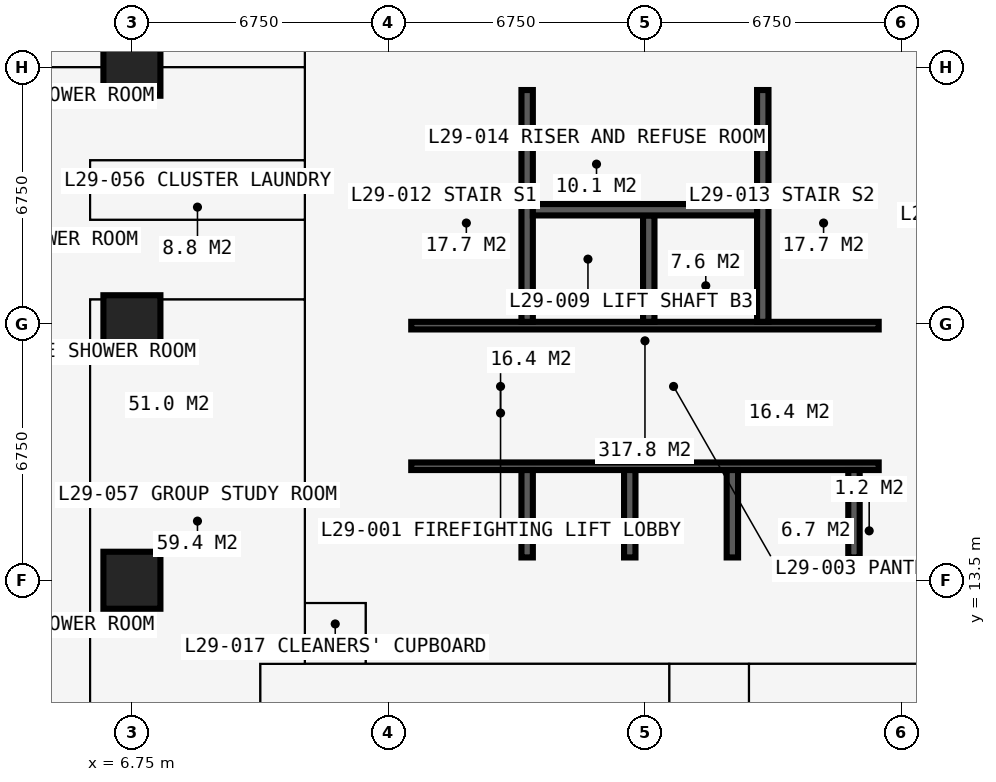
"""IFC4 building model, lengths in metres.
Left out: names, types, materials, properties, quantities, classifications, styles, units other than length and angle.
Written with IfcOpenShell. Run it as: python <this file> out.ifc"""

import sys

from ifc_helpers import new_model, si_unit, direction, frame, frame_2d, origin, origin_2d, place, context, subcontext, project, spatial, rectangle, extrude, element, fill, save


model = new_model("IFC4")
c1 = context("Model", 3, precision=1e-05, world=origin(), true_north=direction((0.0, 1.0)))
c2 = subcontext(c1, "Body", "Model", "MODEL_VIEW")
j1 = project(units=[si_unit("LENGTHUNIT", "METRE"), si_unit("PLANEANGLEUNIT", "RADIAN")], contexts=[c1])
p1 = place(None, origin())
s1 = spatial("IfcSite", under=j1, at=p1, CompositionType="ELEMENT")
p2 = place(p1, origin())
s2 = spatial("IfcBuilding", under=s1, at=p2, CompositionType="ELEMENT")
p3 = place(p2, frame((0.0, 0.0, 108.9)))
s3 = spatial("IfcBuildingStorey", under=s2, at=p3, CompositionType="ELEMENT", Elevation=108.9)
for number, where, z_axis, x_axis in (
    (1, (6.75, 13.5, 0.0), (0.0, 0.0, 1.0), (1.0, 0.0, 0.0)),
    (2, (6.75, 20.25, 0.0), (0.0, 0.0, 1.0), (1.0, 0.0, 0.0)),
    (3, (6.75, 27.0, 0.0), (0.0, 0.0, 1.0), (1.0, 0.0, 0.0)),
):
    element("IfcColumn", number, at=place(p3, frame(where, z_axis=z_axis, x_axis=x_axis)), inside=s3, PredefinedType="COLUMN", context=c2, shape_type="SweptSolid", body=[
        extrude(rectangle(XDim=1.5, YDim=1.5, at=origin_2d()), origin(), (0.0, 0.0, 1.0), 3.6),
    ])
p4 = place(p3, frame((12.9, 13.5, 0.0), z_axis=(0.0, 0.0, 1.0), x_axis=(1.0, 0.0, 0.0)))
e4 = element("IfcWall", 4, at=p4, inside=s3, PredefinedType="SHEAR", context=c2, shape_type="SweptSolid", body=[
    extrude(rectangle(XDim=14.7, YDim=1.2, at=frame_2d((7.35, 0.0))), origin(), (0.0, 0.0, 1.0), 3.6),
])
p5 = place(p3, frame((27.0, 14.1, 0.0), z_axis=(0.0, 0.0, 1.0), x_axis=(0.0, 1.0, 0.0)))
e5 = element("IfcWall", 5, at=p5, inside=s3, PredefinedType="SHEAR", context=c2, shape_type="SweptSolid", body=[
    extrude(rectangle(XDim=12.3, YDim=1.2, at=frame_2d((6.15, 0.0))), origin(), (0.0, 0.0, 1.0), 3.6),
])
p6 = place(p5, frame((3.65, 0.0, 0.0)))
e6 = element("IfcOpeningElement", 6, at=p6, cuts=e5, PredefinedType="OPENING", context=c2, shape_type="SweptSolid", body=[
    extrude(rectangle(XDim=1.2, YDim=2.2, at=frame_2d((0.6, 1.1))), frame((0.0, 0.61, 0.0), z_axis=(0.0, -1.0, 0.0), x_axis=(1.0, 0.0, 0.0)), (0.0, 0.0, 1.0), 1.22),
])
p7 = place(p3, frame((27.6, 27.0, 0.0), z_axis=(0.0, 0.0, 1.0), x_axis=(-1.0, 0.0, 0.0)))
e7 = element("IfcWall", 7, at=p7, inside=s3, PredefinedType="SHEAR", context=c2, shape_type="SweptSolid", body=[
    extrude(rectangle(XDim=14.7, YDim=1.2, at=frame_2d((7.35, 0.0))), origin(), (0.0, 0.0, 1.0), 3.6),
])
p8 = place(p7, frame((4.55, 0.0, 0.0)))
e8 = element("IfcOpeningElement", 8, at=p8, cuts=e7, PredefinedType="OPENING", context=c2, shape_type="SweptSolid", body=[
    extrude(rectangle(XDim=0.9, YDim=2.2, at=frame_2d((0.45, 1.1))), frame((0.0, 0.61, 0.0), z_axis=(0.0, -1.0, 0.0), x_axis=(1.0, 0.0, 0.0)), (0.0, 0.0, 1.0), 1.22),
])
p9 = place(p7, frame((7.525, 0.0, 0.0)))
e9 = element("IfcOpeningElement", 9, at=p9, cuts=e7, PredefinedType="OPENING", context=c2, shape_type="SweptSolid", body=[
    extrude(rectangle(XDim=1.0, YDim=2.2, at=frame_2d((0.5, 1.1))), frame((0.0, 0.61, 0.0), z_axis=(0.0, -1.0, 0.0), x_axis=(1.0, 0.0, 0.0)), (0.0, 0.0, 1.0), 1.22),
])
p10 = place(p3, frame((13.5, 26.4, 0.0), z_axis=(0.0, 0.0, 1.0), x_axis=(0.0, -1.0, 0.0)))
e10 = element("IfcWall", 10, at=p10, inside=s3, PredefinedType="SHEAR", context=c2, shape_type="SweptSolid", body=[
    extrude(rectangle(XDim=12.3, YDim=1.2, at=frame_2d((6.15, 0.0))), origin(), (0.0, 0.0, 1.0), 3.6),
])
p11 = place(p10, frame((7.45, 0.0, 0.0)))
e11 = element("IfcOpeningElement", 11, at=p11, cuts=e10, PredefinedType="OPENING", context=c2, shape_type="SweptSolid", body=[
    extrude(rectangle(XDim=1.2, YDim=2.2, at=frame_2d((0.6, 1.1))), frame((0.0, 0.61, 0.0), z_axis=(0.0, -1.0, 0.0), x_axis=(1.0, 0.0, 0.0)), (0.0, 0.0, 1.0), 1.22),
])
p12 = place(p3, frame((14.1, 16.5, 0.0), z_axis=(0.0, 0.0, 1.0), x_axis=(1.0, 0.0, 0.0)))
e12 = element("IfcWall", 12, at=p12, inside=s3, PredefinedType="SHEAR", context=c2, shape_type="SweptSolid", body=[
    extrude(rectangle(XDim=12.3, YDim=0.2, at=frame_2d((6.15, 0.0))), origin(), (0.0, 0.0, 1.0), 3.6),
])
p13 = place(p12, frame((0.9, 0.0, 0.0)))
e13 = element("IfcOpeningElement", 13, at=p13, cuts=e12, PredefinedType="OPENING", context=c2, shape_type="SweptSolid", body=[
    extrude(rectangle(XDim=1.1, YDim=2.2, at=frame_2d((0.55, 1.1))), frame((0.0, 0.11, 0.0), z_axis=(0.0, -1.0, 0.0), x_axis=(1.0, 0.0, 0.0)), (0.0, 0.0, 1.0), 0.22),
])
p14 = place(p12, frame((9.5, 0.0, 0.0)))
e14 = element("IfcOpeningElement", 14, at=p14, cuts=e12, PredefinedType="OPENING", context=c2, shape_type="SweptSolid", body=[
    extrude(rectangle(XDim=1.1, YDim=2.2, at=frame_2d((0.55, 1.1))), frame((0.0, 0.11, 0.0), z_axis=(0.0, -1.0, 0.0), x_axis=(1.0, 0.0, 0.0)), (0.0, 0.0, 1.0), 0.22),
])
p15 = place(p3, frame((14.1, 20.2, 0.0), z_axis=(0.0, 0.0, 1.0), x_axis=(1.0, 0.0, 0.0)))
e15 = element("IfcWall", 15, at=p15, inside=s3, PredefinedType="SHEAR", context=c2, shape_type="SweptSolid", body=[
    extrude(rectangle(XDim=12.3, YDim=0.2, at=frame_2d((6.15, 0.0))), origin(), (0.0, 0.0, 1.0), 3.6),
])
p16 = place(p15, frame((0.35, 0.0, 0.0)))
e16 = element("IfcOpeningElement", 16, at=p16, cuts=e15, PredefinedType="OPENING", context=c2, shape_type="SweptSolid", body=[
    extrude(rectangle(XDim=1.1, YDim=2.2, at=frame_2d((0.55, 1.1))), frame((0.0, 0.11, 0.0), z_axis=(0.0, -1.0, 0.0), x_axis=(1.0, 0.0, 0.0)), (0.0, 0.0, 1.0), 0.22),
])
p17 = place(p15, frame((9.75, 0.0, 0.0)))
e17 = element("IfcOpeningElement", 17, at=p17, cuts=e15, PredefinedType="OPENING", context=c2, shape_type="SweptSolid", body=[
    extrude(rectangle(XDim=1.1, YDim=2.2, at=frame_2d((0.55, 1.1))), frame((0.0, 0.11, 0.0), z_axis=(0.0, -1.0, 0.0), x_axis=(1.0, 0.0, 0.0)), (0.0, 0.0, 1.0), 0.22),
])
for number, where, z_axis, x_axis in (
    (18, (17.15, 20.3, 0.0), (0.0, 0.0, 1.0), (0.0, 1.0, 0.0)),
    (19, (23.35, 20.3, 0.0), (0.0, 0.0, 1.0), (0.0, 1.0, 0.0)),
):
    element("IfcWall", number, at=place(p3, frame(where, z_axis=z_axis, x_axis=x_axis)), inside=s3, PredefinedType="SHEAR", context=c2, shape_type="SweptSolid", body=[
        extrude(rectangle(XDim=6.1, YDim=0.3, at=frame_2d((3.05, 0.0))), origin(), (0.0, 0.0, 1.0), 3.6),
    ])
p18 = place(p3, frame((20.35, 20.3, 0.0), z_axis=(0.0, 0.0, 1.0), x_axis=(0.0, 1.0, 0.0)))
e20 = element("IfcWall", 20, at=p18, inside=s3, PredefinedType="SHEAR", context=c2, shape_type="SweptSolid", body=[
    extrude(rectangle(XDim=2.8, YDim=0.3, at=frame_2d((1.4, 0.0))), origin(), (0.0, 0.0, 1.0), 3.6),
])
p19 = place(p3, frame((17.3, 23.25, 0.0), z_axis=(0.0, 0.0, 1.0), x_axis=(1.0, 0.0, 0.0)))
e21 = element("IfcWall", 21, at=p19, inside=s3, PredefinedType="SHEAR", context=c2, shape_type="SweptSolid", body=[
    extrude(rectangle(XDim=5.9, YDim=0.3, at=frame_2d((2.95, 0.0))), origin(), (0.0, 0.0, 1.0), 3.6),
])
for number, where, z_axis, x_axis in (
    (22, (17.15, 14.1, 0.0), (0.0, 0.0, 1.0), (0.0, 1.0, 0.0)),
    (23, (19.85, 14.1, 0.0), (0.0, 0.0, 1.0), (0.0, 1.0, 0.0)),
    (24, (22.55, 14.1, 0.0), (0.0, 0.0, 1.0), (0.0, 1.0, 0.0)),
    (25, (25.75, 14.1, 0.0), (0.0, 0.0, 1.0), (0.0, 1.0, 0.0)),
):
    element("IfcWall", number, at=place(p3, frame(where, z_axis=z_axis, x_axis=x_axis)), inside=s3, PredefinedType="SHEAR", context=c2, shape_type="SweptSolid", body=[
        extrude(rectangle(XDim=2.3, YDim=0.3, at=frame_2d((1.15, 0.0))), origin(), (0.0, 0.0, 1.0), 3.6),
    ])
p20 = place(p3, frame((18.875, 16.6, 0.0), z_axis=(0.0, 0.0, 1.0), x_axis=(0.0, 1.0, 0.0)))
e26 = element("IfcWall", 26, at=p20, inside=s3, PredefinedType="PARTITIONING", context=c2, shape_type="SweptSolid", body=[
    extrude(rectangle(XDim=3.5, YDim=0.15, at=frame_2d((1.75, 0.0))), origin(), (0.0, 0.0, 1.0), 3.375),
])
p21 = place(p20, frame((1.15, 0.0, 0.0)))
e27 = element("IfcOpeningElement", 27, at=p21, cuts=e26, PredefinedType="OPENING", context=c2, shape_type="SweptSolid", body=[
    extrude(rectangle(XDim=1.2, YDim=2.2, at=frame_2d((0.6, 1.1))), frame((0.0, 0.085, 0.0), z_axis=(0.0, -1.0, 0.0), x_axis=(1.0, 0.0, 0.0)), (0.0, 0.0, 1.0), 0.17),
])
p22 = place(p3, frame((21.625, 16.6, 0.0), z_axis=(0.0, 0.0, 1.0), x_axis=(0.0, 1.0, 0.0)))
e28 = element("IfcWall", 28, at=p22, inside=s3, PredefinedType="PARTITIONING", context=c2, shape_type="SweptSolid", body=[
    extrude(rectangle(XDim=3.5, YDim=0.15, at=frame_2d((1.75, 0.0))), origin(), (0.0, 0.0, 1.0), 3.375),
])
p23 = place(p22, frame((1.15, 0.0, 0.0)))
e29 = element("IfcOpeningElement", 29, at=p23, cuts=e28, PredefinedType="OPENING", context=c2, shape_type="SweptSolid", body=[
    extrude(rectangle(XDim=1.2, YDim=2.2, at=frame_2d((0.6, 1.1))), frame((0.0, 0.085, 0.0), z_axis=(0.0, -1.0, 0.0), x_axis=(1.0, 0.0, 0.0)), (0.0, 0.0, 1.0), 0.17),
])
p24 = place(p3, frame((20.38, 16.6, 0.0), z_axis=(0.0, 0.0, 1.0), x_axis=(0.0, 1.0, 0.0)))
e30 = element("IfcWall", 30, at=p24, inside=s3, PredefinedType="PARTITIONING", context=c2, shape_type="SweptSolid", body=[
    extrude(rectangle(XDim=3.5, YDim=0.15, at=frame_2d((1.75, 0.0))), origin(), (0.0, 0.0, 1.0), 3.375),
])
p25 = place(p3, frame((20.725, 23.4, 0.0), z_axis=(0.0, 0.0, 1.0), x_axis=(0.0, 1.0, 0.0)))
e31 = element("IfcWall", 31, at=p25, inside=s3, PredefinedType="PARTITIONING", context=c2, shape_type="SweptSolid", body=[
    extrude(rectangle(XDim=3.0, YDim=0.15, at=frame_2d((1.5, 0.0))), origin(), (0.0, 0.0, 1.0), 3.375),
])
p26 = place(p3, frame((-0.734, 27.0, 0.0), z_axis=(0.0, 0.0, 1.0), x_axis=(1.0, 0.0, 0.0)))
e32 = element("IfcWall", 32, at=p26, inside=s3, PredefinedType="PARTITIONING", context=c2, shape_type="SweptSolid", body=[
    extrude(rectangle(XDim=12.034, YDim=0.15, at=frame_2d((6.017, 0.0))), origin(), (0.0, 0.0, 1.0), 2.806),
])
p27 = place(p26, frame((8.234, 0.0, 0.0)))
e33 = element("IfcOpeningElement", 33, at=p27, cuts=e32, PredefinedType="OPENING", context=c2, shape_type="SweptSolid", body=[
    extrude(rectangle(XDim=1.0, YDim=2.2, at=frame_2d((0.5, 1.1))), frame((0.0, 0.085, 0.0), z_axis=(0.0, -1.0, 0.0), x_axis=(1.0, 0.0, 0.0)), (0.0, 0.0, 1.0), 0.17),
])
p28 = place(p3, frame((5.65, 10.125, 0.0), z_axis=(0.0, 0.0, 1.0), x_axis=(0.0, 1.0, 0.0)))
e34 = element("IfcWall", 34, at=p28, inside=s3, PredefinedType="PARTITIONING", context=c2, shape_type="SweptSolid", body=[
    extrude(rectangle(XDim=10.762, YDim=0.15, at=frame_2d((5.381, 0.0))), origin(), (0.0, 0.0, 1.0), 3.375),
])
p29 = place(p3, frame((5.65, 20.887, 0.0), z_axis=(0.0, 0.0, 1.0), x_axis=(1.0, 0.0, 0.0)))
e35 = element("IfcWall", 35, at=p29, inside=s3, PredefinedType="PARTITIONING", context=c2, shape_type="SweptSolid", body=[
    extrude(rectangle(XDim=5.65, YDim=0.15, at=frame_2d((2.825, 0.0))), origin(), (0.0, 0.0, 1.0), 3.375),
])
p30 = place(p3, frame((5.65, 22.988, 0.0), z_axis=(0.0, 0.0, 1.0), x_axis=(0.0, 1.0, 0.0)))
e36 = element("IfcWall", 36, at=p30, inside=s3, PredefinedType="PARTITIONING", context=c2, shape_type="SweptSolid", body=[
    extrude(rectangle(XDim=1.562, YDim=0.15, at=frame_2d((0.781, 0.0))), origin(), (0.0, 0.0, 1.0), 3.375),
])
p31 = place(p3, frame((5.65, 22.988, 0.0), z_axis=(0.0, 0.0, 1.0), x_axis=(1.0, 0.0, 0.0)))
e37 = element("IfcWall", 37, at=p31, inside=s3, PredefinedType="PARTITIONING", context=c2, shape_type="SweptSolid", body=[
    extrude(rectangle(XDim=5.65, YDim=0.15, at=frame_2d((2.825, 0.0))), origin(), (0.0, 0.0, 1.0), 3.375),
])
p32 = place(p31, frame((2.35, 0.0, 0.0)))
e38 = element("IfcOpeningElement", 38, at=p32, cuts=e37, PredefinedType="OPENING", context=c2, shape_type="SweptSolid", body=[
    extrude(rectangle(XDim=0.95, YDim=2.2, at=frame_2d((0.475, 1.1))), frame((0.0, 0.085, 0.0), z_axis=(0.0, -1.0, 0.0), x_axis=(1.0, 0.0, 0.0)), (0.0, 0.0, 1.0), 0.17),
])
p33 = place(p3, frame((5.65, 24.55, 0.0), z_axis=(0.0, 0.0, 1.0), x_axis=(1.0, 0.0, 0.0)))
e39 = element("IfcWall", 39, at=p33, inside=s3, PredefinedType="PARTITIONING", context=c2, shape_type="SweptSolid", body=[
    extrude(rectangle(XDim=5.65, YDim=0.15, at=frame_2d((2.825, 0.0))), origin(), (0.0, 0.0, 1.0), 3.375),
])
p34 = place(p3, frame((10.125, 10.125, 0.0), z_axis=(0.0, 0.0, 1.0), x_axis=(0.0, 1.0, 0.0)))
e40 = element("IfcWall", 40, at=p34, inside=s3, PredefinedType="PARTITIONING", context=c2, shape_type="SweptSolid", body=[
    extrude(rectangle(XDim=1.175, YDim=0.15, at=frame_2d((0.587, 0.0))), origin(), (0.0, 0.0, 1.0), 3.375),
])
p35 = place(p3, frame((10.125, 11.3, 0.0), z_axis=(0.0, 0.0, 1.0), x_axis=(1.0, 0.0, 0.0)))
e41 = element("IfcWall", 41, at=p35, inside=s3, PredefinedType="PARTITIONING", context=c2, shape_type="SweptSolid", body=[
    extrude(rectangle(XDim=20.675, YDim=0.15, at=frame_2d((10.337, 0.0))), origin(), (0.0, 0.0, 1.0), 3.375),
])
p36 = place(p35, frame((11.312, 0.0, 0.0)))
e42 = element("IfcOpeningElement", 42, at=p36, cuts=e41, PredefinedType="OPENING", context=c2, shape_type="SweptSolid", body=[
    extrude(rectangle(XDim=1.0, YDim=2.2, at=frame_2d((0.5, 1.1))), frame((0.0, 0.085, 0.0), z_axis=(0.0, -1.0, 0.0), x_axis=(1.0, 0.0, 0.0)), (0.0, 0.0, 1.0), 0.17),
])
p37 = place(p3, frame((11.3, 11.3, 0.0), z_axis=(0.0, 0.0, 1.0), x_axis=(0.0, 1.0, 0.0)))
e43 = element("IfcWall", 43, at=p37, inside=s3, PredefinedType="PARTITIONING", context=c2, shape_type="SweptSolid", body=[
    extrude(rectangle(XDim=19.075, YDim=0.15, at=frame_2d((9.538, 0.0))), origin(), (0.0, 0.0, 1.0), 3.375),
])
p38 = place(p37, frame((13.95, 0.0, 0.0)))
e44 = element("IfcOpeningElement", 44, at=p38, cuts=e43, PredefinedType="OPENING", context=c2, shape_type="SweptSolid", body=[
    extrude(rectangle(XDim=1.0, YDim=2.2, at=frame_2d((0.5, 1.1))), frame((0.0, 0.085, 0.0), z_axis=(0.0, -1.0, 0.0), x_axis=(1.0, 0.0, 0.0)), (0.0, 0.0, 1.0), 0.17),
])
p39 = place(p3, frame((11.3, 12.9, 0.0), z_axis=(0.0, 0.0, 1.0), x_axis=(1.0, 0.0, 0.0)))
e45 = element("IfcWall", 45, at=p39, inside=s3, PredefinedType="PARTITIONING", context=c2, shape_type="SweptSolid", body=[
    extrude(rectangle(XDim=1.6, YDim=0.15, at=frame_2d((0.8, 0.0))), origin(), (0.0, 0.0, 1.0), 2.806),
])
p40 = place(p39, frame((0.3, 0.0, 0.0)))
e46 = element("IfcOpeningElement", 46, at=p40, cuts=e45, PredefinedType="OPENING", context=c2, shape_type="SweptSolid", body=[
    extrude(rectangle(XDim=0.95, YDim=2.2, at=frame_2d((0.475, 1.1))), frame((0.0, 0.085, 0.0), z_axis=(0.0, -1.0, 0.0), x_axis=(1.0, 0.0, 0.0)), (0.0, 0.0, 1.0), 0.17),
])
p41 = place(p3, frame((12.9, 11.3, 0.0), z_axis=(0.0, 0.0, 1.0), x_axis=(0.0, 1.0, 0.0)))
e47 = element("IfcWall", 47, at=p41, inside=s3, PredefinedType="PARTITIONING", context=c2, shape_type="SweptSolid", body=[
    extrude(rectangle(XDim=1.6, YDim=0.15, at=frame_2d((0.8, 0.0))), origin(), (0.0, 0.0, 1.0), 3.375),
])
for number, where, z_axis, x_axis in (
    (48, (20.887, 5.65, 0.0), (0.0, 0.0, 1.0), (0.0, 1.0, 0.0)),
    (49, (22.988, 5.65, 0.0), (0.0, 0.0, 1.0), (0.0, 1.0, 0.0)),
):
    element("IfcWall", number, at=place(p3, frame(where, z_axis=z_axis, x_axis=x_axis)), inside=s3, PredefinedType="PARTITIONING", context=c2, shape_type="SweptSolid", body=[
        extrude(rectangle(XDim=5.65, YDim=0.15, at=frame_2d((2.825, 0.0))), origin(), (0.0, 0.0, 1.0), 3.375),
    ])
p42 = place(p13, origin())
e50 = element("IfcDoor", 50, at=p42, inside=s3, OperationType="DOUBLE_DOOR_SLIDING", PredefinedType="DOOR", context=c2, shape_type="SweptSolid", body=[
    extrude(rectangle(XDim=1.1, YDim=2.2, at=frame_2d((0.55, 1.1))), frame((0.0, 0.025, 0.0), z_axis=(0.0, -1.0, 0.0), x_axis=(1.0, 0.0, 0.0)), (0.0, 0.0, 1.0), 0.05),
])
fill(e13, e50)
p43 = place(p14, origin())
e51 = element("IfcDoor", 51, at=p43, inside=s3, OperationType="DOUBLE_DOOR_SLIDING", PredefinedType="DOOR", context=c2, shape_type="SweptSolid", body=[
    extrude(rectangle(XDim=1.1, YDim=2.2, at=frame_2d((0.55, 1.1))), frame((0.0, 0.025, 0.0), z_axis=(0.0, -1.0, 0.0), x_axis=(1.0, 0.0, 0.0)), (0.0, 0.0, 1.0), 0.05),
])
fill(e14, e51)
p44 = place(p11, origin())
e52 = element("IfcDoor", 52, at=p44, inside=s3, OperationType="DOUBLE_DOOR_SINGLE_SWING", PredefinedType="DOOR", context=c2, shape_type="SweptSolid", body=[
    extrude(rectangle(XDim=1.2, YDim=2.2, at=frame_2d((0.6, 1.1))), frame((0.0, 0.025, 0.0), z_axis=(0.0, -1.0, 0.0), x_axis=(1.0, 0.0, 0.0)), (0.0, 0.0, 1.0), 0.05),
])
fill(e11, e52)
p45 = place(p6, origin())
e53 = element("IfcDoor", 53, at=p45, inside=s3, OperationType="DOUBLE_DOOR_SINGLE_SWING", PredefinedType="DOOR", context=c2, shape_type="SweptSolid", body=[
    extrude(rectangle(XDim=1.2, YDim=2.2, at=frame_2d((0.6, 1.1))), frame((0.0, 0.025, 0.0), z_axis=(0.0, -1.0, 0.0), x_axis=(1.0, 0.0, 0.0)), (0.0, 0.0, 1.0), 0.05),
])
fill(e6, e53)
p46 = place(p21, origin())
e54 = element("IfcDoor", 54, at=p46, inside=s3, OperationType="DOUBLE_DOOR_SINGLE_SWING", PredefinedType="DOOR", context=c2, shape_type="SweptSolid", body=[
    extrude(rectangle(XDim=1.2, YDim=2.2, at=frame_2d((0.6, 1.1))), frame((0.0, 0.025, 0.0), z_axis=(0.0, -1.0, 0.0), x_axis=(1.0, 0.0, 0.0)), (0.0, 0.0, 1.0), 0.05),
])
fill(e27, e54)
p47 = place(p23, origin())
e55 = element("IfcDoor", 55, at=p47, inside=s3, OperationType="DOUBLE_DOOR_SINGLE_SWING", PredefinedType="DOOR", context=c2, shape_type="SweptSolid", body=[
    extrude(rectangle(XDim=1.2, YDim=2.2, at=frame_2d((0.6, 1.1))), frame((0.0, 0.025, 0.0), z_axis=(0.0, -1.0, 0.0), x_axis=(1.0, 0.0, 0.0)), (0.0, 0.0, 1.0), 0.05),
])
fill(e29, e55)
p48 = place(p8, origin())
e56 = element("IfcDoor", 56, at=p48, inside=s3, OperationType="SINGLE_SWING_LEFT", PredefinedType="DOOR", context=c2, shape_type="SweptSolid", body=[
    extrude(rectangle(XDim=0.9, YDim=2.2, at=frame_2d((0.45, 1.1))), frame((0.0, 0.4, 0.0), z_axis=(0.0, -1.0, 0.0), x_axis=(1.0, 0.0, 0.0)), (0.0, 0.0, 1.0), 0.8),
])
fill(e8, e56)
p49 = place(p9, origin())
e57 = element("IfcDoor", 57, at=p49, inside=s3, OperationType="SINGLE_SWING_LEFT", PredefinedType="DOOR", context=c2, shape_type="SweptSolid", body=[
    extrude(rectangle(XDim=1.0, YDim=2.2, at=frame_2d((0.5, 1.1))), frame((0.0, 0.025, 0.0), z_axis=(0.0, -1.0, 0.0), x_axis=(1.0, 0.0, 0.0)), (0.0, 0.0, 1.0), 0.05),
])
fill(e9, e57)
p50 = place(p16, origin())
e58 = element("IfcDoor", 58, at=p50, inside=s3, OperationType="SINGLE_SWING_LEFT", PredefinedType="DOOR", context=c2, shape_type="SweptSolid", body=[
    extrude(rectangle(XDim=1.1, YDim=2.2, at=frame_2d((0.55, 1.1))), frame((0.0, 0.025, 0.0), z_axis=(0.0, -1.0, 0.0), x_axis=(1.0, 0.0, 0.0)), (0.0, 0.0, 1.0), 0.05),
])
fill(e16, e58)
p51 = place(p17, origin())
e59 = element("IfcDoor", 59, at=p51, inside=s3, OperationType="SINGLE_SWING_LEFT", PredefinedType="DOOR", context=c2, shape_type="SweptSolid", body=[
    extrude(rectangle(XDim=1.1, YDim=2.2, at=frame_2d((0.55, 1.1))), frame((0.0, 0.025, 0.0), z_axis=(0.0, -1.0, 0.0), x_axis=(1.0, 0.0, 0.0)), (0.0, 0.0, 1.0), 0.05),
])
fill(e17, e59)
p52 = place(p40, origin())
e60 = element("IfcDoor", 60, at=p52, inside=s3, OperationType="SINGLE_SWING_LEFT", PredefinedType="DOOR", context=c2, shape_type="SweptSolid", body=[
    extrude(rectangle(XDim=0.95, YDim=2.2, at=frame_2d((0.475, 1.1))), frame((0.0, 0.025, 0.0), z_axis=(0.0, -1.0, 0.0), x_axis=(1.0, 0.0, 0.0)), (0.0, 0.0, 1.0), 0.05),
])
fill(e46, e60)
p53 = place(p36, origin())
e61 = element("IfcDoor", 61, at=p53, inside=s3, OperationType="SINGLE_SWING_LEFT", PredefinedType="DOOR", context=c2, shape_type="SweptSolid", body=[
    extrude(rectangle(XDim=1.0, YDim=2.2, at=frame_2d((0.5, 1.1))), frame((0.0, 0.025, 0.0), z_axis=(0.0, -1.0, 0.0), x_axis=(1.0, 0.0, 0.0)), (0.0, 0.0, 1.0), 0.05),
])
fill(e42, e61)
p54 = place(p27, origin())
e62 = element("IfcDoor", 62, at=p54, inside=s3, OperationType="SINGLE_SWING_LEFT", PredefinedType="DOOR", context=c2, shape_type="SweptSolid", body=[
    extrude(rectangle(XDim=1.0, YDim=2.2, at=frame_2d((0.5, 1.1))), frame((0.0, 0.025, 0.0), z_axis=(0.0, -1.0, 0.0), x_axis=(1.0, 0.0, 0.0)), (0.0, 0.0, 1.0), 0.05),
])
fill(e33, e62)
p55 = place(p38, origin())
e63 = element("IfcDoor", 63, at=p55, inside=s3, OperationType="SINGLE_SWING_LEFT", PredefinedType="DOOR", context=c2, shape_type="SweptSolid", body=[
    extrude(rectangle(XDim=1.0, YDim=2.2, at=frame_2d((0.5, 1.1))), frame((0.0, 0.025, 0.0), z_axis=(0.0, -1.0, 0.0), x_axis=(1.0, 0.0, 0.0)), (0.0, 0.0, 1.0), 0.05),
])
fill(e44, e63)
p56 = place(p32, origin())
e64 = element("IfcDoor", 64, at=p56, inside=s3, OperationType="SINGLE_SWING_LEFT", PredefinedType="DOOR", context=c2, shape_type="SweptSolid", body=[
    extrude(rectangle(XDim=0.95, YDim=2.2, at=frame_2d((0.475, 1.1))), frame((0.0, 0.025, 0.0), z_axis=(0.0, -1.0, 0.0), x_axis=(1.0, 0.0, 0.0)), (0.0, 0.0, 1.0), 0.05),
])
fill(e38, e64)
save(model, sys.argv[1])
